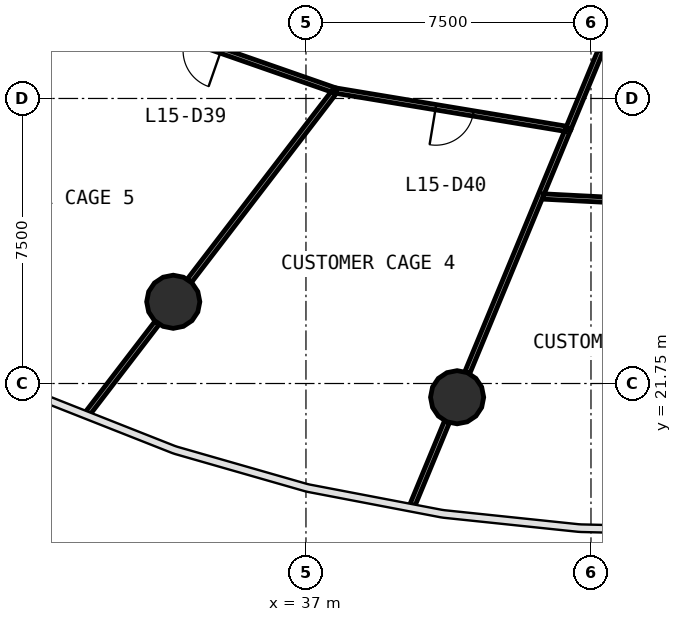
"""IFC4 building model, lengths in metres.
Left out: names, types, materials, properties, quantities, classifications, styles, units other than length and angle.
Written with IfcOpenShell. Run it as: python <this file> out.ifc"""

import sys

from ifc_helpers import new_model, si_unit, direction, frame, frame_2d, origin, origin_2d, place, context, subcontext, project, spatial, rectangle, circle, extrude, source, transform, mapped, element, fill, save


model = new_model("IFC4")
c1 = context("Model", 3, precision=1e-05, world=origin(), true_north=direction((0.0, 1.0)))
c2 = subcontext(c1, "Body", "Model", "MODEL_VIEW")
j1 = project(units=[si_unit("LENGTHUNIT", "METRE"), si_unit("PLANEANGLEUNIT", "RADIAN")], contexts=[c1])
p1 = place(None, origin())
s1 = spatial("IfcSite", under=j1, at=p1, CompositionType="ELEMENT")
p2 = place(p1, origin())
s2 = spatial("IfcBuilding", under=s1, at=p2, CompositionType="ELEMENT")
p3 = place(p2, frame((0.0, 0.0, 66.6)))
s3 = spatial("IfcBuildingStorey", under=s2, at=p3, CompositionType="ELEMENT", Elevation=66.6)
m1 = source(origin(), c2, "Body", "SweptSolid", [
    extrude(circle(Radius=0.7, at=origin_2d()), origin(), (0.0, 0.0, 1.0), 4.4),
])
for number, where, z_axis, x_axis in (
    (1, (33.508, 23.9, 0.0), (0.0, 0.0, 1.0), (1.0, 0.0, 0.0)),
    (2, (40.977, 21.389, 0.0), (0.0, 0.0, 1.0), (1.0, 0.0, 0.0)),
):
    element("IfcColumn", number, at=place(p3, frame(where, z_axis=z_axis, x_axis=x_axis)), inside=s3, PredefinedType="COLUMN", context=c2, shape_type="MappedRepresentation", body=[
        mapped(m1, transform((0.0, 0.0, 0.0), scale=1.0)),
    ])
p4 = place(p3, frame((37.773, 29.459, 0.0), z_axis=(0.0, 0.0, 1.0), x_axis=(-0.944197740639, 0.329379153215, 0.0)))
e3 = element("IfcWall", 3, at=p4, inside=s3, PredefinedType="PARTITIONING", context=c2, shape_type="SweptSolid", body=[
    extrude(rectangle(XDim=7.234, YDim=0.14, at=frame_2d((3.617, 0.0))), origin(), (0.0, 0.0, 1.0), 3.05),
])
p5 = place(p4, frame((3.184, 0.0, 0.0)))
e4 = element("IfcOpeningElement", 4, at=p5, cuts=e3, PredefinedType="OPENING", context=c2, shape_type="SweptSolid", body=[
    extrude(rectangle(XDim=1.0, YDim=2.1, at=frame_2d((0.5, 1.05))), frame((0.0, 0.08, 0.0), z_axis=(0.0, -1.0, 0.0), x_axis=(1.0, 0.0, 0.0)), (0.0, 0.0, 1.0), 0.16),
])
p6 = place(p3, frame((43.899, 28.442, 0.0), z_axis=(0.0, 0.0, 1.0), x_axis=(-0.382643242671, -0.923896178603, 0.0)))
e5 = element("IfcWall", 5, at=p6, inside=s3, PredefinedType="PARTITIONING", context=c2, shape_type="SweptSolid", body=[
    extrude(rectangle(XDim=6.93, YDim=0.14, at=frame_2d((3.465, 0.0))), origin(), (0.0, 0.0, 1.0), 3.05),
])
p7 = place(p3, frame((37.728, 29.4, 0.0), z_axis=(0.0, 0.0, 1.0), x_axis=(-0.608768873777, -0.793347627664, 0.0)))
e6 = element("IfcWall", 6, at=p7, inside=s3, PredefinedType="PARTITIONING", context=c2, shape_type="SweptSolid", body=[
    extrude(rectangle(XDim=6.229, YDim=0.14, at=frame_2d((3.114, 0.0))), origin(), (0.0, 0.0, 1.0), 3.05),
])
p8 = place(p3, frame((43.828, 28.454, 0.0), z_axis=(0.0, 0.0, 1.0), x_axis=(-0.986499590072, 0.163763728546, 0.0)))
e7 = element("IfcWall", 7, at=p8, inside=s3, PredefinedType="PARTITIONING", context=c2, shape_type="SweptSolid", body=[
    extrude(rectangle(XDim=6.108, YDim=0.14, at=frame_2d((3.054, 0.0))), origin(), (0.0, 0.0, 1.0), 3.05),
])
p9 = place(p8, frame((2.458, 0.0, 0.0)))
e8 = element("IfcOpeningElement", 8, at=p9, cuts=e7, PredefinedType="OPENING", context=c2, shape_type="SweptSolid", body=[
    extrude(rectangle(XDim=1.0, YDim=2.1, at=frame_2d((0.5, 1.05))), frame((0.0, 0.08, 0.0), z_axis=(0.0, -1.0, 0.0), x_axis=(1.0, 0.0, 0.0)), (0.0, 0.0, 1.0), 0.16),
])
p10 = place(p3, frame((49.152, 26.368, 0.0), z_axis=(0.0, 0.0, 1.0), x_axis=(-0.998693229409, 0.051106100745, 0.0)))
e9 = element("IfcWall", 9, at=p10, inside=s3, PredefinedType="PARTITIONING", context=c2, shape_type="SweptSolid", body=[
    extrude(rectangle(XDim=5.919, YDim=0.14, at=frame_2d((2.959, 0.0))), origin(), (0.0, 0.0, 1.0), 3.05),
])
p11 = place(p10, frame((2.469, 0.0, 0.0)))
e10 = element("IfcOpeningElement", 10, at=p11, cuts=e9, PredefinedType="OPENING", context=c2, shape_type="SweptSolid", body=[
    extrude(rectangle(XDim=1.0, YDim=2.1, at=frame_2d((0.5, 1.05))), frame((0.0, 0.08, 0.0), z_axis=(0.0, -1.0, 0.0), x_axis=(1.0, 0.0, 0.0)), (0.0, 0.0, 1.0), 0.16),
])
p12 = place(p3, frame((30.919, 31.824, 0.0), z_axis=(0.0, 0.0, 1.0), x_axis=(-0.793364806995, -0.608746485018, 0.0)))
e11 = element("IfcWall", 11, at=p12, inside=s3, PredefinedType="PARTITIONING", context=c2, shape_type="SweptSolid", body=[
    extrude(rectangle(XDim=5.288, YDim=0.14, at=frame_2d((2.644, 0.0))), origin(), (0.0, 0.0, 1.0), 3.05),
])
p13 = place(p3, frame((44.752, 30.502, 0.0), z_axis=(0.0, 0.0, 1.0), x_axis=(-0.38265237095, -0.923892397959, 0.0)))
e12 = element("IfcWall", 12, at=p13, inside=s3, PredefinedType="PARTITIONING", context=c2, shape_type="SweptSolid", body=[
    extrude(rectangle(XDim=2.2, YDim=0.14, at=frame_2d((1.1, 0.0))), origin(), (0.0, 0.0, 1.0), 3.05),
])
p14 = place(p3, frame((33.079, 23.342, 0.0), z_axis=(0.0, 0.0, 1.0), x_axis=(-0.608815186384, -0.793312087912, 0.0)))
e13 = element("IfcWall", 13, at=p14, inside=s3, PredefinedType="PARTITIONING", context=c2, shape_type="SweptSolid", body=[
    extrude(rectangle(XDim=2.979, YDim=0.14, at=frame_2d((1.489, 0.0))), origin(), (0.0, 0.0, 1.0), 3.05),
])
p15 = place(p3, frame((39.804, 18.557, 0.0), z_axis=(0.0, 0.0, 1.0), x_axis=(0.382726450362, 0.9238617127, 0.0)))
e14 = element("IfcWall", 14, at=p15, inside=s3, PredefinedType="PARTITIONING", context=c2, shape_type="SweptSolid", body=[
    extrude(rectangle(XDim=2.36, YDim=0.14, at=frame_2d((1.18, 0.0))), origin(), (0.0, 0.0, 1.0), 3.05),
])
m2 = source(origin(), c2, "Body", "SweptSolid", [
    extrude(rectangle(XDim=1.0, YDim=2.1, at=frame_2d((0.5, 1.05))), frame((0.0, 0.025, 0.0), z_axis=(0.0, -1.0, 0.0), x_axis=(1.0, 0.0, 0.0)), (0.0, 0.0, 1.0), 0.05),
])
p16 = place(p9, origin())
e15 = element("IfcDoor", 15, at=p16, inside=s3, OperationType="SINGLE_SWING_RIGHT", PredefinedType="DOOR", context=c2, shape_type="MappedRepresentation", body=[
    mapped(m2, transform((0.0, 0.0, 0.0), scale=1.0)),
])
fill(e8, e15)
save(model, sys.argv[1])
